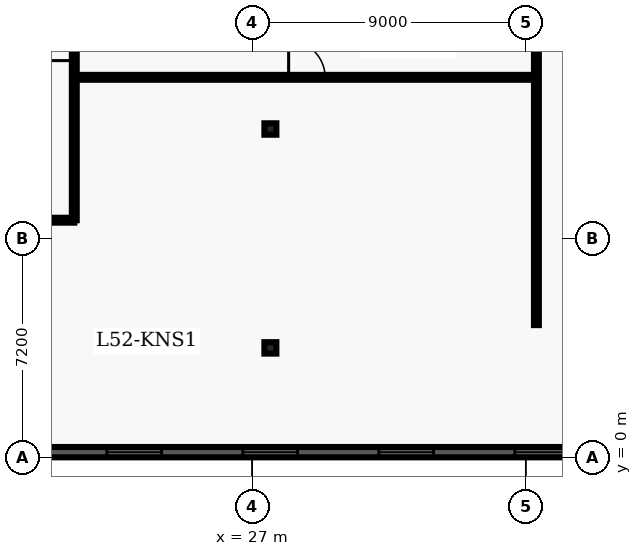
"""IFC4 building model, lengths in metres.
Left out: names, types, materials, properties, quantities, classifications, styles, units other than length and angle.
Written with IfcOpenShell. Run it as: python <this file> out.ifc"""

import sys

from ifc_helpers import new_model, entity, si_unit, converted_unit, direction, frame, origin_with_axes, origin_2d_with_axis, place, context, subcontext, project, spatial, polyline, rectangle, i_section, outline, extrude, element, fill, save


model = new_model("IFC4")
c1 = context("Model", 3, precision=1e-05, world=origin_with_axes(), true_north=direction((0.0, 1.0)))
c2 = subcontext(c1, "Body", "Model", "MODEL_VIEW")
j1 = project(units=[si_unit("LENGTHUNIT", "METRE"), converted_unit("PLANEANGLEUNIT", "DEGREE", entity("IfcPlaneAngleMeasure", 0.017), si_unit("PLANEANGLEUNIT", "RADIAN"), dimensions=[0, 0, 0, 0, 0, 0, 0])], contexts=[c1])
p1 = place(None, origin_with_axes())
s1 = spatial("IfcSite", under=j1, at=p1, CompositionType="ELEMENT")
p2 = place(p1, origin_with_axes())
s2 = spatial("IfcBuilding", under=s1, at=p2, CompositionType="ELEMENT")
p3 = place(p2, frame((0.0, 0.0, 212.1), z_axis=(0.0, 0.0, 1.0), x_axis=(1.0, 0.0, 0.0)))
s3 = spatial("IfcBuildingStorey", under=s2, at=p3, CompositionType="ELEMENT", Elevation=212.1)
for number, where, z_axis, x_axis in (
    (1, (27.6, 3.6, 0.0), (0.0, 0.0, 1.0), (1.0, 0.0, 0.0)),
    (2, (27.6, 10.8, 0.0), (0.0, 0.0, 1.0), (1.0, 0.0, 0.0)),
):
    element("IfcColumn", number, at=place(p3, frame(where, z_axis=z_axis, x_axis=x_axis)), inside=s3, PredefinedType="COLUMN", context=c2, shape_type="SweptSolid", body=[
        extrude(i_section(OverallWidth=0.394, OverallDepth=0.375, WebThickness=0.017, FlangeThickness=0.028, FilletRadius=0.02, at=origin_2d_with_axis()), origin_with_axes(), (0.0, 0.0, 1.0), 3.9),
    ])
p4 = place(p3, frame((2.6, 7.8, 0.0), z_axis=(0.0, 0.0, 1.0), x_axis=(1.0, 0.0, 0.0)))
e3 = element("IfcWall", 3, at=p4, inside=s3, PredefinedType="PARTITIONING", context=c2, shape_type="SweptSolid", body=[
    extrude(outline(polyline([(0.0, -0.08), (18.55, -0.08), (18.55, 0.08), (0.0, 0.08), (0.0, -0.08)])), origin_with_axes(), (0.0, 0.0, 1.0), 2.7),
])
p5 = place(p4, frame((1.817, 0.0, 0.0), z_axis=(0.0, 0.0, 1.0), x_axis=(1.0, 0.0, 0.0)))
e4 = element("IfcOpeningElement", 4, at=p5, cuts=e3, PredefinedType="OPENING", context=c2, shape_type="SweptSolid", body=[
    extrude(rectangle(XDim=1.0, YDim=0.18, at=origin_2d_with_axis()), origin_with_axes(), (0.0, 0.0, 1.0), 2.15),
])
p6 = place(p4, frame((6.503, 0.0, 0.0), z_axis=(0.0, 0.0, 1.0), x_axis=(1.0, 0.0, 0.0)))
e5 = element("IfcOpeningElement", 5, at=p6, cuts=e3, PredefinedType="OPENING", context=c2, shape_type="SweptSolid", body=[
    extrude(rectangle(XDim=1.0, YDim=0.18, at=origin_2d_with_axis()), origin_with_axes(), (0.0, 0.0, 1.0), 2.15),
])
p7 = place(p4, frame((10.728, 0.0, 0.0), z_axis=(0.0, 0.0, 1.0), x_axis=(1.0, 0.0, 0.0)))
e6 = element("IfcOpeningElement", 6, at=p7, cuts=e3, PredefinedType="OPENING", context=c2, shape_type="SweptSolid", body=[
    extrude(rectangle(XDim=1.0, YDim=0.18, at=origin_2d_with_axis()), origin_with_axes(), (0.0, 0.0, 1.0), 2.15),
])
p8 = place(p4, frame((15.578, 0.0, 0.0), z_axis=(0.0, 0.0, 1.0), x_axis=(1.0, 0.0, 0.0)))
e7 = element("IfcOpeningElement", 7, at=p8, cuts=e3, PredefinedType="OPENING", context=c2, shape_type="SweptSolid", body=[
    extrude(rectangle(XDim=1.2, YDim=0.18, at=origin_2d_with_axis()), origin_with_axes(), (0.0, 0.0, 1.0), 2.2),
])
p9 = place(p3, frame((21.15, 7.8, 0.0), z_axis=(0.0, 0.0, 1.0), x_axis=(0.0, 1.0, 0.0)))
e8 = element("IfcWall", 8, at=p9, inside=s3, PredefinedType="PARTITIONING", context=c2, shape_type="SweptSolid", body=[
    extrude(outline(polyline([(0.0, -0.08), (32.7, -0.08), (32.7, 0.08), (0.0, 0.08), (0.0, -0.08)])), origin_with_axes(), (0.0, 0.0, 1.0), 2.7),
])
p10 = place(p9, frame((18.399, 0.0, 0.0), z_axis=(0.0, 0.0, 1.0), x_axis=(1.0, 0.0, 0.0)))
e9 = element("IfcOpeningElement", 9, at=p10, cuts=e8, PredefinedType="OPENING", context=c2, shape_type="SweptSolid", body=[
    extrude(rectangle(XDim=1.0, YDim=0.18, at=origin_2d_with_axis()), origin_with_axes(), (0.0, 0.0, 1.0), 2.15),
])
p11 = place(p9, frame((25.06, 0.0, 0.0), z_axis=(0.0, 0.0, 1.0), x_axis=(1.0, 0.0, 0.0)))
e10 = element("IfcOpeningElement", 10, at=p11, cuts=e8, PredefinedType="OPENING", context=c2, shape_type="SweptSolid", body=[
    extrude(rectangle(XDim=1.0, YDim=0.18, at=origin_2d_with_axis()), origin_with_axes(), (0.0, 0.0, 1.0), 2.15),
])
p12 = place(p9, frame((29.911, 0.0, 0.0), z_axis=(0.0, 0.0, 1.0), x_axis=(1.0, 0.0, 0.0)))
e11 = element("IfcOpeningElement", 11, at=p12, cuts=e8, PredefinedType="OPENING", context=c2, shape_type="SweptSolid", body=[
    extrude(rectangle(XDim=1.0, YDim=0.18, at=origin_2d_with_axis()), origin_with_axes(), (0.0, 0.0, 1.0), 2.15),
])
p13 = place(p9, frame((5.775, 0.0, 0.0), z_axis=(0.0, 0.0, 1.0), x_axis=(1.0, 0.0, 0.0)))
e12 = element("IfcOpeningElement", 12, at=p13, cuts=e8, PredefinedType="OPENING", context=c2, shape_type="SweptSolid", body=[
    extrude(rectangle(XDim=1.05, YDim=0.18, at=origin_2d_with_axis()), origin_with_axes(), (0.0, 0.0, 1.0), 2.15),
])
p14 = place(p3, frame((21.15, 12.5, 0.0), z_axis=(0.0, 0.0, 1.0), x_axis=(1.0, 0.0, 0.0)))
e13 = element("IfcWall", 13, at=p14, inside=s3, PredefinedType="PARTITIONING", context=c2, shape_type="SweptSolid", body=[
    extrude(outline(polyline([(0.0, -0.08), (15.2, -0.08), (15.2, 0.08), (0.0, 0.08), (0.0, -0.08)])), origin_with_axes(), (0.0, 0.0, 1.0), 2.7),
])
p15 = place(p14, frame((7.65, 0.0, 0.0), z_axis=(0.0, 0.0, 1.0), x_axis=(1.0, 0.0, 0.0)))
e14 = element("IfcOpeningElement", 14, at=p15, cuts=e13, PredefinedType="OPENING", context=c2, shape_type="SweptSolid", body=[
    extrude(rectangle(XDim=1.2, YDim=0.18, at=origin_2d_with_axis()), origin_with_axes(), (0.0, 0.0, 1.0), 2.2),
])
p16 = place(p3, frame((36.35, 4.35, 0.0), z_axis=(0.0, 0.0, 1.0), x_axis=(0.0, 1.0, 0.0)))
e15 = element("IfcWall", 15, at=p16, inside=s3, PredefinedType="PARTITIONING", context=c2, shape_type="SweptSolid", body=[
    extrude(outline(polyline([(0.0, -0.08), (16.95, -0.08), (16.95, 0.08), (0.0, 0.08), (0.0, -0.08)])), origin_with_axes(), (0.0, 0.0, 1.0), 2.7),
])
p17 = place(p3, frame((57.26, 0.17, 0.0), z_axis=(0.0, 0.0, 1.0), x_axis=(-1.0, 0.0, 0.0)))
e16 = element("IfcWall", 16, at=p17, inside=s3, PredefinedType="SOLIDWALL", context=c2, shape_type="SweptSolid", body=[
    extrude(outline(polyline([(0.0, -0.17), (54.86, -0.17), (54.86, 0.17), (0.0, 0.17), (0.0, -0.17)])), origin_with_axes(), (0.0, 0.0, 1.0), 3.66),
])
p18 = place(p17, frame((2.836, 0.0, 0.45), z_axis=(0.0, 0.0, 1.0), x_axis=(1.0, 0.0, 0.0)))
e17 = element("IfcOpeningElement", 17, at=p18, cuts=e16, PredefinedType="OPENING", context=c2, shape_type="SweptSolid", body=[
    extrude(rectangle(XDim=1.8, YDim=0.36, at=origin_2d_with_axis()), origin_with_axes(), (0.0, 0.0, 1.0), 2.1),
])
p19 = place(p17, frame((7.307, 0.0, 0.45), z_axis=(0.0, 0.0, 1.0), x_axis=(1.0, 0.0, 0.0)))
e18 = element("IfcOpeningElement", 18, at=p19, cuts=e16, PredefinedType="OPENING", context=c2, shape_type="SweptSolid", body=[
    extrude(rectangle(XDim=1.8, YDim=0.36, at=origin_2d_with_axis()), origin_with_axes(), (0.0, 0.0, 1.0), 2.1),
])
p20 = place(p17, frame((11.779, 0.0, 0.45), z_axis=(0.0, 0.0, 1.0), x_axis=(1.0, 0.0, 0.0)))
e19 = element("IfcOpeningElement", 19, at=p20, cuts=e16, PredefinedType="OPENING", context=c2, shape_type="SweptSolid", body=[
    extrude(rectangle(XDim=1.8, YDim=0.36, at=origin_2d_with_axis()), origin_with_axes(), (0.0, 0.0, 1.0), 2.1),
])
p21 = place(p17, frame((16.251, 0.0, 0.45), z_axis=(0.0, 0.0, 1.0), x_axis=(1.0, 0.0, 0.0)))
e20 = element("IfcOpeningElement", 20, at=p21, cuts=e16, PredefinedType="OPENING", context=c2, shape_type="SweptSolid", body=[
    extrude(rectangle(XDim=1.8, YDim=0.36, at=origin_2d_with_axis()), origin_with_axes(), (0.0, 0.0, 1.0), 2.1),
])
p22 = place(p17, frame((20.723, 0.0, 0.45), z_axis=(0.0, 0.0, 1.0), x_axis=(1.0, 0.0, 0.0)))
e21 = element("IfcOpeningElement", 21, at=p22, cuts=e16, PredefinedType="OPENING", context=c2, shape_type="SweptSolid", body=[
    extrude(rectangle(XDim=1.8, YDim=0.36, at=origin_2d_with_axis()), origin_with_axes(), (0.0, 0.0, 1.0), 2.1),
])
p23 = place(p17, frame((25.194, 0.0, 0.45), z_axis=(0.0, 0.0, 1.0), x_axis=(1.0, 0.0, 0.0)))
e22 = element("IfcOpeningElement", 22, at=p23, cuts=e16, PredefinedType="OPENING", context=c2, shape_type="SweptSolid", body=[
    extrude(rectangle(XDim=1.8, YDim=0.36, at=origin_2d_with_axis()), origin_with_axes(), (0.0, 0.0, 1.0), 2.1),
])
p24 = place(p17, frame((29.666, 0.0, 0.45), z_axis=(0.0, 0.0, 1.0), x_axis=(1.0, 0.0, 0.0)))
e23 = element("IfcOpeningElement", 23, at=p24, cuts=e16, PredefinedType="OPENING", context=c2, shape_type="SweptSolid", body=[
    extrude(rectangle(XDim=1.8, YDim=0.36, at=origin_2d_with_axis()), origin_with_axes(), (0.0, 0.0, 1.0), 2.1),
])
p25 = place(p17, frame((34.138, 0.0, 0.45), z_axis=(0.0, 0.0, 1.0), x_axis=(1.0, 0.0, 0.0)))
e24 = element("IfcOpeningElement", 24, at=p25, cuts=e16, PredefinedType="OPENING", context=c2, shape_type="SweptSolid", body=[
    extrude(rectangle(XDim=1.8, YDim=0.36, at=origin_2d_with_axis()), origin_with_axes(), (0.0, 0.0, 1.0), 2.1),
])
p26 = place(p17, frame((38.609, 0.0, 0.45), z_axis=(0.0, 0.0, 1.0), x_axis=(1.0, 0.0, 0.0)))
e25 = element("IfcOpeningElement", 25, at=p26, cuts=e16, PredefinedType="OPENING", context=c2, shape_type="SweptSolid", body=[
    extrude(rectangle(XDim=1.8, YDim=0.36, at=origin_2d_with_axis()), origin_with_axes(), (0.0, 0.0, 1.0), 2.1),
])
p27 = place(p17, frame((43.531, 0.0, 0.45), z_axis=(0.0, 0.0, 1.0), x_axis=(1.0, 0.0, 0.0)))
e26 = element("IfcOpeningElement", 26, at=p27, cuts=e16, PredefinedType="OPENING", context=c2, shape_type="SweptSolid", body=[
    extrude(rectangle(XDim=1.8, YDim=0.36, at=origin_2d_with_axis()), origin_with_axes(), (0.0, 0.0, 1.0), 2.1),
])
p28 = place(p17, frame((47.553, 0.0, 0.45), z_axis=(0.0, 0.0, 1.0), x_axis=(1.0, 0.0, 0.0)))
e27 = element("IfcOpeningElement", 27, at=p28, cuts=e16, PredefinedType="OPENING", context=c2, shape_type="SweptSolid", body=[
    extrude(rectangle(XDim=1.8, YDim=0.36, at=origin_2d_with_axis()), origin_with_axes(), (0.0, 0.0, 1.0), 2.1),
])
p29 = place(p17, frame((52.474, 0.0, 0.45), z_axis=(0.0, 0.0, 1.0), x_axis=(1.0, 0.0, 0.0)))
e28 = element("IfcOpeningElement", 28, at=p29, cuts=e16, PredefinedType="OPENING", context=c2, shape_type="SweptSolid", body=[
    extrude(rectangle(XDim=1.8, YDim=0.36, at=origin_2d_with_axis()), origin_with_axes(), (0.0, 0.0, 1.0), 2.1),
])
p30 = place(p9, frame((5.775, 0.0, 0.0), z_axis=(0.0, 0.0, 1.0), x_axis=(1.0, 0.0, 0.0)))
e29 = element("IfcDoor", 29, at=p30, inside=s3, OperationType="SINGLE_SWING_LEFT", PredefinedType="DOOR", context=c2, shape_type="SweptSolid", body=[
    extrude(rectangle(XDim=1.05, YDim=0.09, at=origin_2d_with_axis()), origin_with_axes(), (0.0, 0.0, 1.0), 2.15),
])
fill(e12, e29)
p31 = place(p14, frame((7.65, 0.0, 0.0), z_axis=(0.0, 0.0, 1.0), x_axis=(1.0, 0.0, 0.0)))
e30 = element("IfcDoor", 30, at=p31, inside=s3, OperationType="SINGLE_SWING_LEFT", PredefinedType="DOOR", context=c2, shape_type="SweptSolid", body=[
    extrude(rectangle(XDim=1.2, YDim=0.09, at=origin_2d_with_axis()), origin_with_axes(), (0.0, 0.0, 1.0), 2.2),
])
fill(e14, e30)
p32 = place(p17, frame((20.723, 0.0, 0.45), z_axis=(0.0, 0.0, 1.0), x_axis=(1.0, 0.0, 0.0)))
e31 = element("IfcWindow", 31, at=p32, inside=s3, PredefinedType="WINDOW", context=c2, shape_type="SweptSolid", body=[
    extrude(rectangle(XDim=1.8, YDim=0.09, at=origin_2d_with_axis()), origin_with_axes(), (0.0, 0.0, 1.0), 2.1),
])
fill(e21, e31)
p33 = place(p17, frame((25.194, 0.0, 0.45), z_axis=(0.0, 0.0, 1.0), x_axis=(1.0, 0.0, 0.0)))
e32 = element("IfcWindow", 32, at=p33, inside=s3, PredefinedType="WINDOW", context=c2, shape_type="SweptSolid", body=[
    extrude(rectangle(XDim=1.8, YDim=0.09, at=origin_2d_with_axis()), origin_with_axes(), (0.0, 0.0, 1.0), 2.1),
])
fill(e22, e32)
p34 = place(p17, frame((29.666, 0.0, 0.45), z_axis=(0.0, 0.0, 1.0), x_axis=(1.0, 0.0, 0.0)))
e33 = element("IfcWindow", 33, at=p34, inside=s3, PredefinedType="WINDOW", context=c2, shape_type="SweptSolid", body=[
    extrude(rectangle(XDim=1.8, YDim=0.09, at=origin_2d_with_axis()), origin_with_axes(), (0.0, 0.0, 1.0), 2.1),
])
fill(e23, e33)
p35 = place(p17, frame((34.138, 0.0, 0.45), z_axis=(0.0, 0.0, 1.0), x_axis=(1.0, 0.0, 0.0)))
e34 = element("IfcWindow", 34, at=p35, inside=s3, PredefinedType="WINDOW", context=c2, shape_type="SweptSolid", body=[
    extrude(rectangle(XDim=1.8, YDim=0.09, at=origin_2d_with_axis()), origin_with_axes(), (0.0, 0.0, 1.0), 2.1),
])
fill(e24, e34)
save(model, sys.argv[1])
